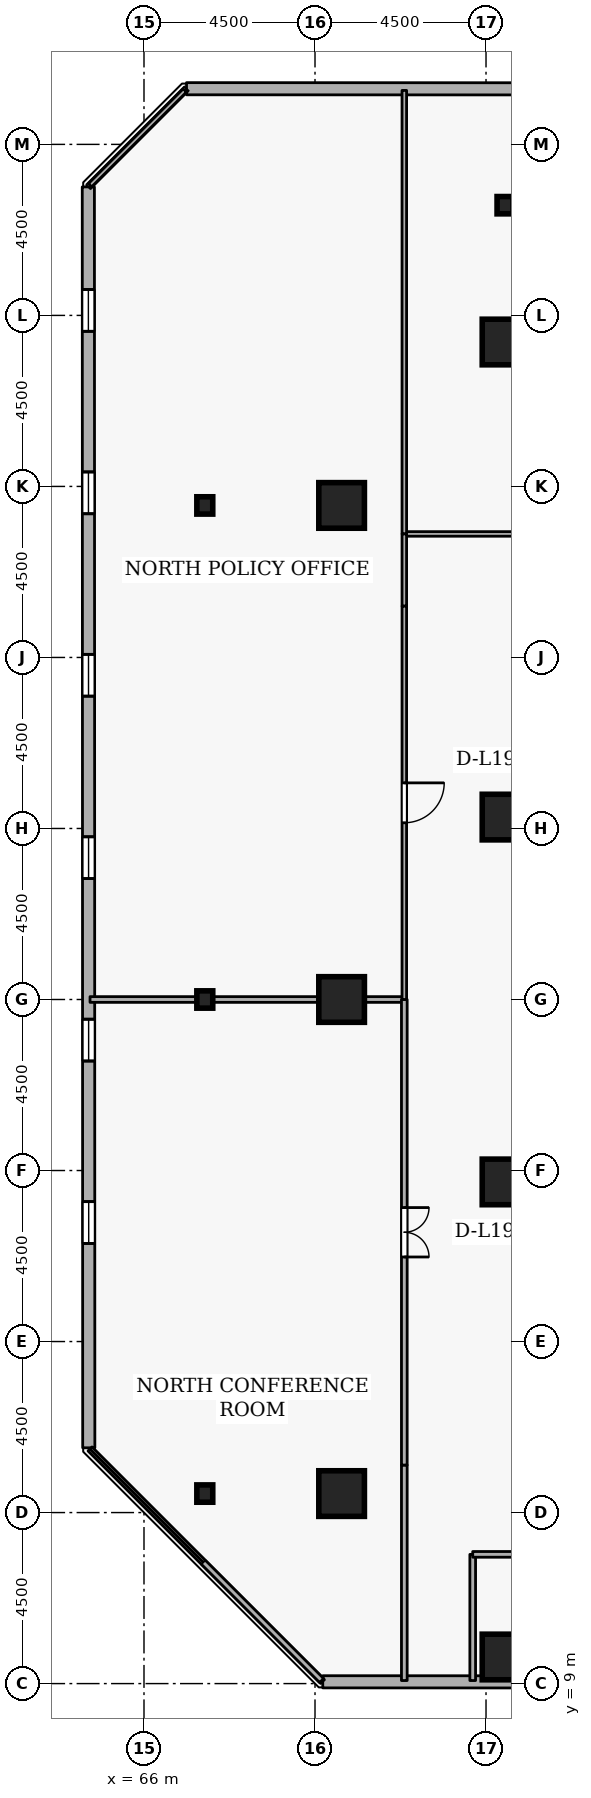
"""IFC4 building model, lengths in metres.
Left out: names, types, materials, properties, quantities, classifications, styles, units other than length and angle.
Written with IfcOpenShell. Run it as: python <this file> out.ifc"""

import sys

from ifc_helpers import new_model, si_unit, direction, frame, frame_2d, origin, origin_2d, place, context, subcontext, project, spatial, rectangle, i_section, extrude, element, fill, save


model = new_model("IFC4")
c1 = context("Model", 3, precision=1e-05, world=origin(), true_north=direction((0.0, 1.0)))
c2 = subcontext(c1, "Body", "Model", "MODEL_VIEW")
j1 = project(units=[si_unit("LENGTHUNIT", "METRE"), si_unit("PLANEANGLEUNIT", "RADIAN")], contexts=[c1])
p1 = place(None, origin())
s1 = spatial("IfcSite", under=j1, at=p1, CompositionType="ELEMENT")
p2 = place(p1, origin())
s2 = spatial("IfcBuilding", under=s1, at=p2, CompositionType="ELEMENT")
p3 = place(p2, frame((0.0, 0.0, 75.9)))
s3 = spatial("IfcBuildingStorey", under=s2, at=p3, CompositionType="ELEMENT", Elevation=75.9)
for number, where, z_axis, x_axis in (
    (1, (75.5, 44.3, 0.0), (0.0, 0.0, 1.0), (1.0, 0.0, 0.0)),
    (2, (71.2, 14.0, 0.0), (0.0, 0.0, 1.0), (1.0, 0.0, 0.0)),
    (3, (71.2, 27.0, 0.0), (0.0, 0.0, 1.0), (1.0, 0.0, 0.0)),
    (4, (71.2, 40.0, 0.0), (0.0, 0.0, 1.0), (1.0, 0.0, 0.0)),
    (5, (75.5, 9.7, 0.0), (0.0, 0.0, 1.0), (1.0, 0.0, 0.0)),
    (6, (75.5, 22.2, 0.0), (0.0, 0.0, 1.0), (1.0, 0.0, 0.0)),
    (7, (75.5, 31.8, 0.0), (0.0, 0.0, 1.0), (1.0, 0.0, 0.0)),
):
    element("IfcColumn", number, at=place(p3, frame(where, z_axis=z_axis, x_axis=x_axis)), inside=s3, PredefinedType="COLUMN", context=c2, shape_type="SweptSolid", body=[
        extrude(rectangle(XDim=1.2, YDim=1.2, at=origin_2d()), origin(), (0.0, 0.0, 1.0), 4.2),
    ])
for number, where, z_axis, x_axis in (
    (8, (75.5, 47.9, 0.0), (0.0, 0.0, 1.0), (1.0, 0.0, 0.0)),
    (9, (67.6, 14.0, 0.0), (0.0, 0.0, 1.0), (1.0, 0.0, 0.0)),
    (10, (67.6, 27.0, 0.0), (0.0, 0.0, 1.0), (1.0, 0.0, 0.0)),
    (11, (67.6, 40.0, 0.0), (0.0, 0.0, 1.0), (1.0, 0.0, 0.0)),
):
    element("IfcColumn", number, at=place(p3, frame(where, z_axis=z_axis, x_axis=x_axis)), inside=s3, PredefinedType="COLUMN", context=c2, shape_type="SweptSolid", body=[
        extrude(i_section(OverallWidth=0.418, OverallDepth=0.456, WebThickness=0.042, FlangeThickness=0.067, FilletRadius=0.015, at=origin_2d()), origin(), (0.0, 0.0, 1.0), 4.2),
    ])
p4 = place(p3, frame((70.704, 9.047, 0.0), z_axis=(0.0, 0.0, 1.0), x_axis=(0.99999993762, -0.000353213856, 0.0)))
e12 = element("IfcWall", 12, at=p4, inside=s3, PredefinedType="STANDARD", context=c2, shape_type="SweptSolid", body=[
    extrude(rectangle(XDim=33.177, YDim=0.32, at=frame_2d((16.589, 0.0))), origin(), (0.0, 0.0, 1.0), 3.3),
])
p5 = place(p3, frame((100.296, 50.953, 0.0), z_axis=(0.0, 0.0, 1.0), x_axis=(-0.99999993762, 0.000353213856, 0.0)))
e13 = element("IfcWall", 13, at=p5, inside=s3, PredefinedType="STANDARD", context=c2, shape_type="SweptSolid", body=[
    extrude(rectangle(XDim=33.177, YDim=0.32, at=frame_2d((16.589, 0.0))), origin(), (0.0, 0.0, 1.0), 3.3),
])
p6 = place(p5, frame((2.7, 0.0, 0.72)))
e14 = element("IfcOpeningElement", 14, at=p6, cuts=e13, PredefinedType="OPENING", context=c2, shape_type="SweptSolid", body=[
    extrude(rectangle(XDim=1.1, YDim=1.8, at=frame_2d((0.55, 0.9))), frame((0.0, 0.17, 0.0), z_axis=(0.0, -1.0, 0.0), x_axis=(1.0, 0.0, 0.0)), (0.0, 0.0, 1.0), 0.34),
])
p7 = place(p5, frame((7.5, 0.0, 0.72)))
e15 = element("IfcOpeningElement", 15, at=p7, cuts=e13, PredefinedType="OPENING", context=c2, shape_type="SweptSolid", body=[
    extrude(rectangle(XDim=1.1, YDim=1.8, at=frame_2d((0.55, 0.9))), frame((0.0, 0.17, 0.0), z_axis=(0.0, -1.0, 0.0), x_axis=(1.0, 0.0, 0.0)), (0.0, 0.0, 1.0), 0.34),
])
p8 = place(p5, frame((12.3, 0.0, 0.72)))
e16 = element("IfcOpeningElement", 16, at=p8, cuts=e13, PredefinedType="OPENING", context=c2, shape_type="SweptSolid", body=[
    extrude(rectangle(XDim=1.1, YDim=1.8, at=frame_2d((0.55, 0.9))), frame((0.0, 0.17, 0.0), z_axis=(0.0, -1.0, 0.0), x_axis=(1.0, 0.0, 0.0)), (0.0, 0.0, 1.0), 0.34),
])
p9 = place(p5, frame((17.1, 0.0, 0.72)))
e17 = element("IfcOpeningElement", 17, at=p9, cuts=e13, PredefinedType="OPENING", context=c2, shape_type="SweptSolid", body=[
    extrude(rectangle(XDim=1.1, YDim=1.8, at=frame_2d((0.55, 0.9))), frame((0.0, 0.17, 0.0), z_axis=(0.0, -1.0, 0.0), x_axis=(1.0, 0.0, 0.0)), (0.0, 0.0, 1.0), 0.34),
])
p10 = place(p5, frame((21.9, 0.0, 0.72)))
e18 = element("IfcOpeningElement", 18, at=p10, cuts=e13, PredefinedType="OPENING", context=c2, shape_type="SweptSolid", body=[
    extrude(rectangle(XDim=1.1, YDim=1.8, at=frame_2d((0.55, 0.9))), frame((0.0, 0.17, 0.0), z_axis=(0.0, -1.0, 0.0), x_axis=(1.0, 0.0, 0.0)), (0.0, 0.0, 1.0), 0.34),
])
p11 = place(p3, frame((64.535, 48.381, 0.0), z_axis=(0.0, 0.0, 1.0), x_axis=(0.000353213856, -0.99999993762, 0.0)))
e19 = element("IfcWall", 19, at=p11, inside=s3, PredefinedType="STANDARD", context=c2, shape_type="SweptSolid", body=[
    extrude(rectangle(XDim=33.177, YDim=0.32, at=frame_2d((16.589, 0.0))), origin(), (0.0, 0.0, 1.0), 3.3),
])
p12 = place(p11, frame((2.7, 0.0, 0.72)))
e20 = element("IfcOpeningElement", 20, at=p12, cuts=e19, PredefinedType="OPENING", context=c2, shape_type="SweptSolid", body=[
    extrude(rectangle(XDim=1.1, YDim=1.8, at=frame_2d((0.55, 0.9))), frame((0.0, 0.17, 0.0), z_axis=(0.0, -1.0, 0.0), x_axis=(1.0, 0.0, 0.0)), (0.0, 0.0, 1.0), 0.34),
])
p13 = place(p11, frame((7.5, 0.0, 0.72)))
e21 = element("IfcOpeningElement", 21, at=p13, cuts=e19, PredefinedType="OPENING", context=c2, shape_type="SweptSolid", body=[
    extrude(rectangle(XDim=1.1, YDim=1.8, at=frame_2d((0.55, 0.9))), frame((0.0, 0.17, 0.0), z_axis=(0.0, -1.0, 0.0), x_axis=(1.0, 0.0, 0.0)), (0.0, 0.0, 1.0), 0.34),
])
p14 = place(p11, frame((12.3, 0.0, 0.72)))
e22 = element("IfcOpeningElement", 22, at=p14, cuts=e19, PredefinedType="OPENING", context=c2, shape_type="SweptSolid", body=[
    extrude(rectangle(XDim=1.1, YDim=1.8, at=frame_2d((0.55, 0.9))), frame((0.0, 0.17, 0.0), z_axis=(0.0, -1.0, 0.0), x_axis=(1.0, 0.0, 0.0)), (0.0, 0.0, 1.0), 0.34),
])
p15 = place(p11, frame((17.1, 0.0, 0.72)))
e23 = element("IfcOpeningElement", 23, at=p15, cuts=e19, PredefinedType="OPENING", context=c2, shape_type="SweptSolid", body=[
    extrude(rectangle(XDim=1.1, YDim=1.8, at=frame_2d((0.55, 0.9))), frame((0.0, 0.17, 0.0), z_axis=(0.0, -1.0, 0.0), x_axis=(1.0, 0.0, 0.0)), (0.0, 0.0, 1.0), 0.34),
])
p16 = place(p11, frame((21.9, 0.0, 0.72)))
e24 = element("IfcOpeningElement", 24, at=p16, cuts=e19, PredefinedType="OPENING", context=c2, shape_type="SweptSolid", body=[
    extrude(rectangle(XDim=1.1, YDim=1.8, at=frame_2d((0.55, 0.9))), frame((0.0, 0.17, 0.0), z_axis=(0.0, -1.0, 0.0), x_axis=(1.0, 0.0, 0.0)), (0.0, 0.0, 1.0), 0.34),
])
p17 = place(p11, frame((26.7, 0.0, 0.72)))
e25 = element("IfcOpeningElement", 25, at=p17, cuts=e19, PredefinedType="OPENING", context=c2, shape_type="SweptSolid", body=[
    extrude(rectangle(XDim=1.1, YDim=1.8, at=frame_2d((0.55, 0.9))), frame((0.0, 0.17, 0.0), z_axis=(0.0, -1.0, 0.0), x_axis=(1.0, 0.0, 0.0)), (0.0, 0.0, 1.0), 0.34),
])
p18 = place(p3, frame((74.65, 9.08, 0.0), z_axis=(0.0, 0.0, 1.0), x_axis=(0.0, 1.0, 0.0)))
e26 = element("IfcWall", 26, at=p18, inside=s3, PredefinedType="PARTITIONING", context=c2, shape_type="SweptSolid", body=[
    extrude(rectangle(XDim=3.32, YDim=0.15, at=frame_2d((1.66, 0.0))), origin(), (0.0, 0.0, 1.0), 3.94),
])
p19 = place(p3, frame((74.65, 12.4, 0.0), z_axis=(0.0, 0.0, 1.0), x_axis=(1.0, 0.0, 0.0)))
e27 = element("IfcWall", 27, at=p19, inside=s3, PredefinedType="PARTITIONING", context=c2, shape_type="SweptSolid", body=[
    extrude(rectangle(XDim=4.802, YDim=0.15, at=frame_2d((2.401, 0.0))), origin(), (0.0, 0.0, 1.0), 3.94),
])
p20 = place(p3, frame((82.2, 39.25, 0.0), z_axis=(0.0, 0.0, 1.0), x_axis=(-1.0, 0.0, 0.0)))
e28 = element("IfcWall", 28, at=p20, inside=s3, PredefinedType="PARTITIONING", context=c2, shape_type="SweptSolid", body=[
    extrude(rectangle(XDim=9.35, YDim=0.12, at=frame_2d((4.675, 0.0))), origin(), (0.0, 0.0, 1.0), 3.94),
])
p21 = place(p20, frame((4.15, 0.0, 0.0)))
e29 = element("IfcOpeningElement", 29, at=p21, cuts=e28, PredefinedType="OPENING", context=c2, shape_type="SweptSolid", body=[
    extrude(rectangle(XDim=1.05, YDim=2.1, at=frame_2d((0.525, 1.05))), frame((0.0, 0.07, 0.0), z_axis=(0.0, -1.0, 0.0), x_axis=(1.0, 0.0, 0.0)), (0.0, 0.0, 1.0), 0.14),
])
p22 = place(p3, frame((72.85, 39.25, 0.0), z_axis=(0.0, 0.0, 1.0), x_axis=(0.0, 1.0, 0.0)))
e30 = element("IfcWall", 30, at=p22, inside=s3, PredefinedType="PARTITIONING", context=c2, shape_type="SweptSolid", body=[
    extrude(rectangle(XDim=11.67, YDim=0.12, at=frame_2d((5.835, 0.0))), origin(), (0.0, 0.0, 1.0), 3.94),
])
p23 = place(p3, frame((72.85, 14.75, 0.0), z_axis=(0.0, 0.0, 1.0), x_axis=(0.0, -1.0, 0.0)))
e31 = element("IfcWall", 31, at=p23, inside=s3, PredefinedType="PARTITIONING", context=c2, shape_type="SweptSolid", body=[
    extrude(rectangle(XDim=5.67, YDim=0.15, at=frame_2d((2.835, 0.0))), origin(), (0.0, 0.0, 1.0), 3.94),
])
p24 = place(p3, frame((70.675, 9.08, 0.0), z_axis=(0.0, 0.0, 1.0), x_axis=(-0.707106781187, 0.707106781187, 0.0)))
e32 = element("IfcWall", 32, at=p24, inside=s3, PredefinedType="PARTITIONING", context=c2, shape_type="SweptSolid", body=[
    extrude(rectangle(XDim=8.619, YDim=0.15, at=frame_2d((4.31, 0.0))), origin(), (0.0, 0.0, 1.0), 3.94),
])
p25 = place(p3, frame((64.58, 27.0, 0.0), z_axis=(0.0, 0.0, 1.0), x_axis=(1.0, 0.0, 0.0)))
e33 = element("IfcWall", 33, at=p25, inside=s3, PredefinedType="PARTITIONING", context=c2, shape_type="SweptSolid", body=[
    extrude(rectangle(XDim=8.27, YDim=0.15, at=frame_2d((4.135, 0.0))), origin(), (0.0, 0.0, 1.0), 3.482),
])
p26 = place(p3, frame((72.85, 27.0, 0.0), z_axis=(0.0, 0.0, 1.0), x_axis=(0.0, -1.0, 0.0)))
e34 = element("IfcWall", 34, at=p26, inside=s3, PredefinedType="PARTITIONING", context=c2, shape_type="SweptSolid", body=[
    extrude(rectangle(XDim=12.25, YDim=0.15, at=frame_2d((6.125, 0.0))), origin(), (0.0, 0.0, 1.0), 3.94),
])
p27 = place(p26, frame((5.475, 0.0, 0.0)))
e35 = element("IfcOpeningElement", 35, at=p27, cuts=e34, PredefinedType="OPENING", context=c2, shape_type="SweptSolid", body=[
    extrude(rectangle(XDim=1.3, YDim=2.12, at=frame_2d((0.65, 1.06))), frame((0.0, 0.085, 0.0), z_axis=(0.0, -1.0, 0.0), x_axis=(1.0, 0.0, 0.0)), (0.0, 0.0, 1.0), 0.17),
])
p28 = place(p3, frame((64.58, 48.425, 0.0), z_axis=(0.0, 0.0, 1.0), x_axis=(0.707106781187, 0.707106781187, 0.0)))
e36 = element("IfcWall", 36, at=p28, inside=s3, PredefinedType="PARTITIONING", context=c2, shape_type="SweptSolid", body=[
    extrude(rectangle(XDim=3.528, YDim=0.12, at=frame_2d((1.764, 0.0))), origin(), (0.0, 0.0, 1.0), 3.94),
])
p29 = place(p3, frame((72.85, 39.25, 0.0), z_axis=(0.0, 0.0, 1.0), x_axis=(0.0, -1.0, 0.0)))
e37 = element("IfcWall", 37, at=p29, inside=s3, PredefinedType="PARTITIONING", context=c2, shape_type="SweptSolid", body=[
    extrude(rectangle(XDim=1.9, YDim=0.12, at=frame_2d((0.95, 0.0))), origin(), (0.0, 0.0, 1.0), 3.495),
])
p30 = place(p3, frame((72.85, 37.35, 0.0), z_axis=(0.0, 0.0, 1.0), x_axis=(0.0, -1.0, 0.0)))
e38 = element("IfcWall", 38, at=p30, inside=s3, PredefinedType="PARTITIONING", context=c2, shape_type="SweptSolid", body=[
    extrude(rectangle(XDim=10.35, YDim=0.12, at=frame_2d((5.175, 0.0))), origin(), (0.0, 0.0, 1.0), 3.495),
])
p31 = place(p30, frame((4.65, 0.0, 0.0)))
e39 = element("IfcOpeningElement", 39, at=p31, cuts=e38, PredefinedType="OPENING", context=c2, shape_type="SweptSolid", body=[
    extrude(rectangle(XDim=1.05, YDim=2.1, at=frame_2d((0.525, 1.05))), frame((0.0, 0.07, 0.0), z_axis=(0.0, -1.0, 0.0), x_axis=(1.0, 0.0, 0.0)), (0.0, 0.0, 1.0), 0.14),
])
p32 = place(p12, origin())
e40 = element("IfcWindow", 40, at=p32, inside=s3, PartitioningType="SINGLE_PANEL", PredefinedType="WINDOW", context=c2, shape_type="SweptSolid", body=[
    extrude(rectangle(XDim=1.1, YDim=1.8, at=frame_2d((0.55, 0.9))), frame((0.0, 0.03, 0.0), z_axis=(0.0, -1.0, 0.0), x_axis=(1.0, 0.0, 0.0)), (0.0, 0.0, 1.0), 0.06),
])
fill(e20, e40)
p33 = place(p13, origin())
e41 = element("IfcWindow", 41, at=p33, inside=s3, PartitioningType="SINGLE_PANEL", PredefinedType="WINDOW", context=c2, shape_type="SweptSolid", body=[
    extrude(rectangle(XDim=1.1, YDim=1.8, at=frame_2d((0.55, 0.9))), frame((0.0, 0.03, 0.0), z_axis=(0.0, -1.0, 0.0), x_axis=(1.0, 0.0, 0.0)), (0.0, 0.0, 1.0), 0.06),
])
fill(e21, e41)
p34 = place(p14, origin())
e42 = element("IfcWindow", 42, at=p34, inside=s3, PartitioningType="SINGLE_PANEL", PredefinedType="WINDOW", context=c2, shape_type="SweptSolid", body=[
    extrude(rectangle(XDim=1.1, YDim=1.8, at=frame_2d((0.55, 0.9))), frame((0.0, 0.03, 0.0), z_axis=(0.0, -1.0, 0.0), x_axis=(1.0, 0.0, 0.0)), (0.0, 0.0, 1.0), 0.06),
])
fill(e22, e42)
p35 = place(p15, origin())
e43 = element("IfcWindow", 43, at=p35, inside=s3, PartitioningType="SINGLE_PANEL", PredefinedType="WINDOW", context=c2, shape_type="SweptSolid", body=[
    extrude(rectangle(XDim=1.1, YDim=1.8, at=frame_2d((0.55, 0.9))), frame((0.0, 0.03, 0.0), z_axis=(0.0, -1.0, 0.0), x_axis=(1.0, 0.0, 0.0)), (0.0, 0.0, 1.0), 0.06),
])
fill(e23, e43)
p36 = place(p16, origin())
e44 = element("IfcWindow", 44, at=p36, inside=s3, PartitioningType="SINGLE_PANEL", PredefinedType="WINDOW", context=c2, shape_type="SweptSolid", body=[
    extrude(rectangle(XDim=1.1, YDim=1.8, at=frame_2d((0.55, 0.9))), frame((0.0, 0.03, 0.0), z_axis=(0.0, -1.0, 0.0), x_axis=(1.0, 0.0, 0.0)), (0.0, 0.0, 1.0), 0.06),
])
fill(e24, e44)
p37 = place(p17, origin())
e45 = element("IfcWindow", 45, at=p37, inside=s3, PartitioningType="SINGLE_PANEL", PredefinedType="WINDOW", context=c2, shape_type="SweptSolid", body=[
    extrude(rectangle(XDim=1.1, YDim=1.8, at=frame_2d((0.55, 0.9))), frame((0.0, 0.03, 0.0), z_axis=(0.0, -1.0, 0.0), x_axis=(1.0, 0.0, 0.0)), (0.0, 0.0, 1.0), 0.06),
])
fill(e25, e45)
p38 = place(p27, origin())
e46 = element("IfcDoor", 46, at=p38, inside=s3, OperationType="DOUBLE_DOOR_SINGLE_SWING", PredefinedType="DOOR", context=c2, shape_type="SweptSolid", body=[
    extrude(rectangle(XDim=1.3, YDim=2.12, at=frame_2d((0.65, 1.06))), frame((0.0, 0.025, 0.0), z_axis=(0.0, -1.0, 0.0), x_axis=(1.0, 0.0, 0.0)), (0.0, 0.0, 1.0), 0.05),
])
fill(e35, e46)
p39 = place(p31, origin())
e47 = element("IfcDoor", 47, at=p39, inside=s3, OperationType="SINGLE_SWING_LEFT", PredefinedType="DOOR", context=c2, shape_type="SweptSolid", body=[
    extrude(rectangle(XDim=1.05, YDim=2.1, at=frame_2d((0.525, 1.05))), frame((0.0, 0.025, 0.0), z_axis=(0.0, -1.0, 0.0), x_axis=(1.0, 0.0, 0.0)), (0.0, 0.0, 1.0), 0.05),
])
fill(e39, e47)
save(model, sys.argv[1])
